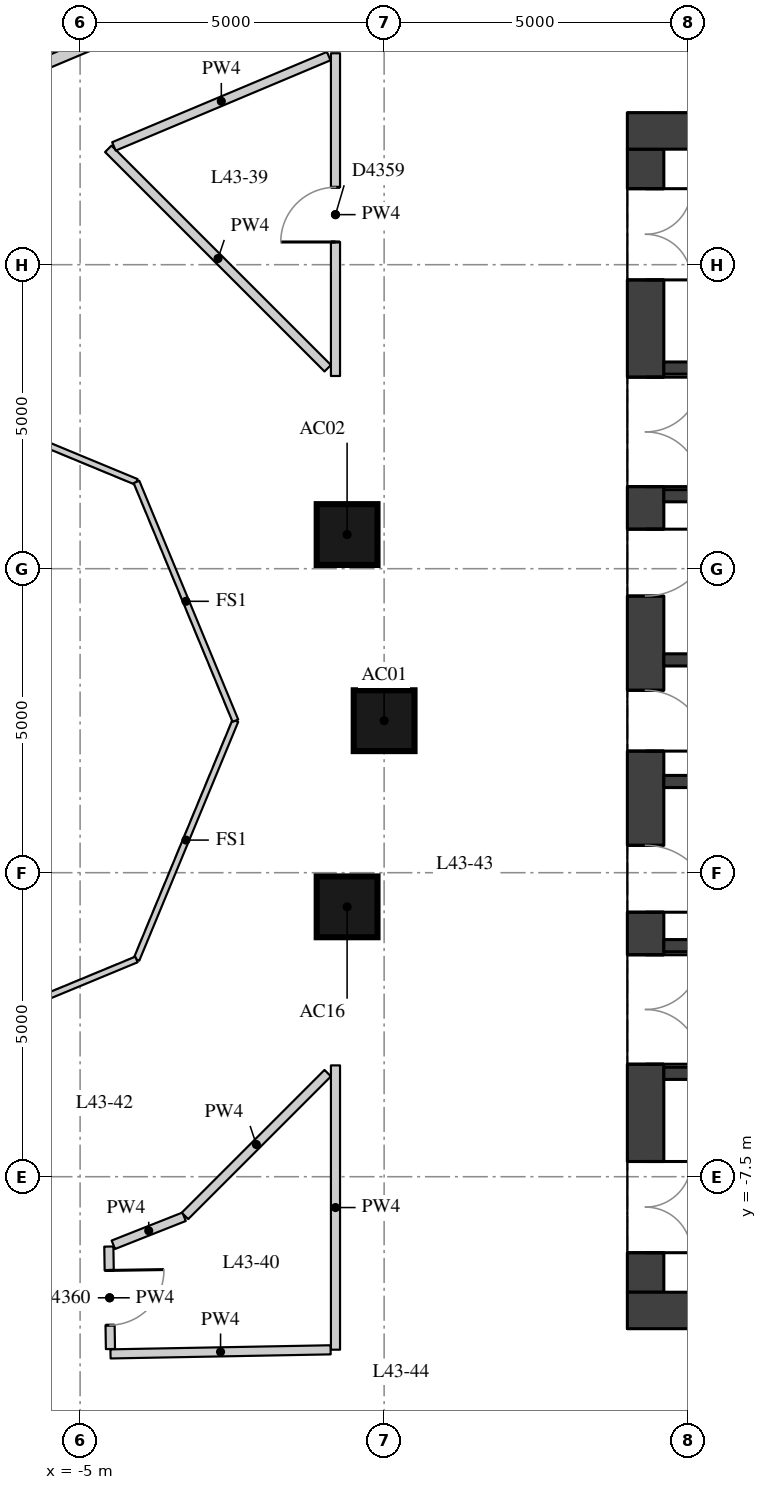
"""IFC4 building model, lengths in metres.
Left out: names, types, materials, properties, quantities, classifications, styles, units other than length and angle.
Written with IfcOpenShell. Run it as: python <this file> out.ifc"""

import sys

from ifc_helpers import new_model, si_unit, direction, frame, frame_2d, origin, origin_2d, place, context, subcontext, project, spatial, rectangle, extrude, element, fill, save


model = new_model("IFC4")
c1 = context("Model", 3, precision=1e-05, world=origin(), true_north=direction((0.0, 1.0)))
c2 = subcontext(c1, "Body", "Model", "MODEL_VIEW")
j1 = project(units=[si_unit("LENGTHUNIT", "METRE"), si_unit("PLANEANGLEUNIT", "RADIAN")], contexts=[c1])
p1 = place(None, origin())
s1 = spatial("IfcSite", under=j1, at=p1, CompositionType="ELEMENT")
p2 = place(p1, origin())
s2 = spatial("IfcBuilding", under=s1, at=p2, CompositionType="ELEMENT")
p3 = place(p2, frame((0.0, 0.0, 155.0)))
s3 = spatial("IfcBuildingStorey", under=s2, at=p3, CompositionType="ELEMENT", Elevation=155.0)
for number, where, z_axis, x_axis in (
    (1, (0.0, 0.0, 0.0), (0.0, 0.0, 1.0), (1.0, 0.0, 0.0)),
    (2, (-0.609, 3.062, 0.0), (0.0, 0.0, 1.0), (1.0, 0.0, 0.0)),
    (3, (-0.609, -3.062, 0.0), (0.0, 0.0, 1.0), (1.0, 0.0, 0.0)),
):
    element("IfcColumn", number, at=place(p3, frame(where, z_axis=z_axis, x_axis=x_axis)), inside=s3, PredefinedType="COLUMN", context=c2, shape_type="SweptSolid", body=[
        extrude(rectangle(XDim=1.0, YDim=1.0, at=origin_2d()), origin(), (0.0, 0.0, 1.0), 3.3),
    ])
p4 = place(p3, frame((4.3, -9.4, 0.0), z_axis=(0.0, 0.0, 1.0), x_axis=(0.0, 1.0, 0.0)))
e4 = element("IfcWall", 4, at=p4, inside=s3, PredefinedType="SHEAR", context=c2, shape_type="SweptSolid", body=[
    extrude(rectangle(XDim=18.8, YDim=0.6, at=frame_2d((9.4, 0.0))), origin(), (0.0, 0.0, 1.0), 3.02),
])
p5 = place(p4, frame((0.65, 0.0, 0.0)))
e5 = element("IfcOpeningElement", 5, at=p5, cuts=e4, PredefinedType="OPENING", context=c2, shape_type="SweptSolid", body=[
    extrude(rectangle(XDim=1.5, YDim=2.1, at=frame_2d((0.75, 1.05))), frame((0.0, 0.31, 0.0), z_axis=(0.0, -1.0, 0.0), x_axis=(1.0, 0.0, 0.0)), (0.0, 0.0, 1.0), 0.62),
])
p6 = place(p4, frame((3.75, 0.0, 0.0)))
e6 = element("IfcOpeningElement", 6, at=p6, cuts=e4, PredefinedType="OPENING", context=c2, shape_type="SweptSolid", body=[
    extrude(rectangle(XDim=1.8, YDim=2.1, at=frame_2d((0.9, 1.05))), frame((0.0, 0.31, 0.0), z_axis=(0.0, -1.0, 0.0), x_axis=(1.0, 0.0, 0.0)), (0.0, 0.0, 1.0), 0.62),
])
p7 = place(p4, frame((6.25, 0.0, 0.0)))
e7 = element("IfcOpeningElement", 7, at=p7, cuts=e4, PredefinedType="OPENING", context=c2, shape_type="SweptSolid", body=[
    extrude(rectangle(XDim=1.1, YDim=2.1, at=frame_2d((0.55, 1.05))), frame((0.0, 0.31, 0.0), z_axis=(0.0, -1.0, 0.0), x_axis=(1.0, 0.0, 0.0)), (0.0, 0.0, 1.0), 0.62),
])
p8 = place(p4, frame((8.9, 0.0, 0.0)))
e8 = element("IfcOpeningElement", 8, at=p8, cuts=e4, PredefinedType="OPENING", context=c2, shape_type="SweptSolid", body=[
    extrude(rectangle(XDim=1.0, YDim=2.1, at=frame_2d((0.5, 1.05))), frame((0.0, 0.31, 0.0), z_axis=(0.0, -1.0, 0.0), x_axis=(1.0, 0.0, 0.0)), (0.0, 0.0, 1.0), 0.62),
])
p9 = place(p4, frame((11.45, 0.0, 0.0)))
e9 = element("IfcOpeningElement", 9, at=p9, cuts=e4, PredefinedType="OPENING", context=c2, shape_type="SweptSolid", body=[
    extrude(rectangle(XDim=1.1, YDim=2.1, at=frame_2d((0.55, 1.05))), frame((0.0, 0.31, 0.0), z_axis=(0.0, -1.0, 0.0), x_axis=(1.0, 0.0, 0.0)), (0.0, 0.0, 1.0), 0.62),
])
p10 = place(p4, frame((13.25, 0.0, 0.0)))
e10 = element("IfcOpeningElement", 10, at=p10, cuts=e4, PredefinedType="OPENING", context=c2, shape_type="SweptSolid", body=[
    extrude(rectangle(XDim=1.8, YDim=2.1, at=frame_2d((0.9, 1.05))), frame((0.0, 0.31, 0.0), z_axis=(0.0, -1.0, 0.0), x_axis=(1.0, 0.0, 0.0)), (0.0, 0.0, 1.0), 0.62),
])
p11 = place(p4, frame((16.65, 0.0, 0.0)))
e11 = element("IfcOpeningElement", 11, at=p11, cuts=e4, PredefinedType="OPENING", context=c2, shape_type="SweptSolid", body=[
    extrude(rectangle(XDim=1.5, YDim=2.1, at=frame_2d((0.75, 1.05))), frame((0.0, 0.31, 0.0), z_axis=(0.0, -1.0, 0.0), x_axis=(1.0, 0.0, 0.0)), (0.0, 0.0, 1.0), 0.62),
])
for number, where, z_axis, x_axis in (
    (12, (4.0, 9.7, 0.0), (0.0, 0.0, 1.0), (1.0, 0.0, 0.0)),
    (13, (4.0, -9.7, 0.0), (0.0, 0.0, 1.0), (1.0, 0.0, 0.0)),
):
    element("IfcWall", number, at=place(p3, frame(where, z_axis=z_axis, x_axis=x_axis)), inside=s3, PredefinedType="SHEAR", context=c2, shape_type="SweptSolid", body=[
        extrude(rectangle(XDim=12.0, YDim=0.6, at=frame_2d((6.0, 0.0))), origin(), (0.0, 0.0, 1.0), 3.02),
    ])
p12 = place(p3, frame((4.6, 5.8, 0.0), z_axis=(0.0, 0.0, 1.0), x_axis=(1.0, 0.0, 0.0)))
e14 = element("IfcWall", 14, at=p12, inside=s3, PredefinedType="SHEAR", context=c2, shape_type="SweptSolid", body=[
    extrude(rectangle(XDim=10.8, YDim=0.2, at=frame_2d((5.4, 0.0))), origin(), (0.0, 0.0, 1.0), 3.02),
])
p13 = place(p12, frame((7.05, 0.0, 0.0)))
e15 = element("IfcOpeningElement", 15, at=p13, cuts=e14, PredefinedType="OPENING", context=c2, shape_type="SweptSolid", body=[
    extrude(rectangle(XDim=1.1, YDim=2.1, at=frame_2d((0.55, 1.05))), frame((0.0, 0.11, 0.0), z_axis=(0.0, -1.0, 0.0), x_axis=(1.0, 0.0, 0.0)), (0.0, 0.0, 1.0), 0.22),
])
p14 = place(p12, frame((9.05, 0.0, 0.0)))
e16 = element("IfcOpeningElement", 16, at=p14, cuts=e14, PredefinedType="OPENING", context=c2, shape_type="SweptSolid", body=[
    extrude(rectangle(XDim=1.1, YDim=2.1, at=frame_2d((0.55, 1.05))), frame((0.0, 0.11, 0.0), z_axis=(0.0, -1.0, 0.0), x_axis=(1.0, 0.0, 0.0)), (0.0, 0.0, 1.0), 0.22),
])
p15 = place(p3, frame((4.6, 3.7, 0.0), z_axis=(0.0, 0.0, 1.0), x_axis=(1.0, 0.0, 0.0)))
e17 = element("IfcWall", 17, at=p15, inside=s3, PredefinedType="SHEAR", context=c2, shape_type="SweptSolid", body=[
    extrude(rectangle(XDim=10.8, YDim=0.2, at=frame_2d((5.4, 0.0))), origin(), (0.0, 0.0, 1.0), 3.02),
])
p16 = place(p15, frame((6.6, 0.0, 0.0)))
e18 = element("IfcOpeningElement", 18, at=p16, cuts=e17, PredefinedType="OPENING", context=c2, shape_type="SweptSolid", body=[
    extrude(rectangle(XDim=1.1, YDim=2.1, at=frame_2d((0.55, 1.05))), frame((0.0, 0.11, 0.0), z_axis=(0.0, -1.0, 0.0), x_axis=(1.0, 0.0, 0.0)), (0.0, 0.0, 1.0), 0.22),
])
p17 = place(p15, frame((8.9, 0.0, 0.0)))
e19 = element("IfcOpeningElement", 19, at=p17, cuts=e17, PredefinedType="OPENING", context=c2, shape_type="SweptSolid", body=[
    extrude(rectangle(XDim=1.1, YDim=2.1, at=frame_2d((0.55, 1.05))), frame((0.0, 0.11, 0.0), z_axis=(0.0, -1.0, 0.0), x_axis=(1.0, 0.0, 0.0)), (0.0, 0.0, 1.0), 0.22),
])
for number, where, z_axis, x_axis in (
    (20, (4.6, 1.0, 0.0), (0.0, 0.0, 1.0), (1.0, 0.0, 0.0)),
    (21, (4.6, -1.0, 0.0), (0.0, 0.0, 1.0), (1.0, 0.0, 0.0)),
):
    element("IfcWall", number, at=place(p3, frame(where, z_axis=z_axis, x_axis=x_axis)), inside=s3, PredefinedType="SHEAR", context=c2, shape_type="SweptSolid", body=[
        extrude(rectangle(XDim=10.8, YDim=0.2, at=frame_2d((5.4, 0.0))), origin(), (0.0, 0.0, 1.0), 3.02),
    ])
p18 = place(p3, frame((4.6, -3.7, 0.0), z_axis=(0.0, 0.0, 1.0), x_axis=(1.0, 0.0, 0.0)))
e22 = element("IfcWall", 22, at=p18, inside=s3, PredefinedType="SHEAR", context=c2, shape_type="SweptSolid", body=[
    extrude(rectangle(XDim=10.8, YDim=0.2, at=frame_2d((5.4, 0.0))), origin(), (0.0, 0.0, 1.0), 3.02),
])
p19 = place(p18, frame((6.6, 0.0, 0.0)))
e23 = element("IfcOpeningElement", 23, at=p19, cuts=e22, PredefinedType="OPENING", context=c2, shape_type="SweptSolid", body=[
    extrude(rectangle(XDim=1.1, YDim=2.1, at=frame_2d((0.55, 1.05))), frame((0.0, 0.11, 0.0), z_axis=(0.0, -1.0, 0.0), x_axis=(1.0, 0.0, 0.0)), (0.0, 0.0, 1.0), 0.22),
])
p20 = place(p18, frame((8.9, 0.0, 0.0)))
e24 = element("IfcOpeningElement", 24, at=p20, cuts=e22, PredefinedType="OPENING", context=c2, shape_type="SweptSolid", body=[
    extrude(rectangle(XDim=1.1, YDim=2.1, at=frame_2d((0.55, 1.05))), frame((0.0, 0.11, 0.0), z_axis=(0.0, -1.0, 0.0), x_axis=(1.0, 0.0, 0.0)), (0.0, 0.0, 1.0), 0.22),
])
p21 = place(p3, frame((4.6, -5.8, 0.0), z_axis=(0.0, 0.0, 1.0), x_axis=(1.0, 0.0, 0.0)))
e25 = element("IfcWall", 25, at=p21, inside=s3, PredefinedType="SHEAR", context=c2, shape_type="SweptSolid", body=[
    extrude(rectangle(XDim=10.8, YDim=0.2, at=frame_2d((5.4, 0.0))), origin(), (0.0, 0.0, 1.0), 3.02),
])
p22 = place(p3, frame((-5.343, -12.093, 0.0), z_axis=(0.0, 0.0, 1.0), x_axis=(-0.796104996328, 0.605158520407, 0.0)))
e26 = element("IfcWall", 26, at=p22, inside=s3, PredefinedType="PARTITIONING", context=c2, shape_type="SweptSolid", body=[
    extrude(rectangle(XDim=2.961, YDim=0.2, at=frame_2d((1.48, 0.0))), origin(), (0.0, 0.0, 1.0), 3.02),
])
p23 = place(p3, frame((-7.57, 9.975, 0.0), z_axis=(0.0, 0.0, 1.0), x_axis=(0.921815879705, 0.387628022624, 0.0)))
e27 = element("IfcWall", 27, at=p23, inside=s3, PredefinedType="PARTITIONING", context=c2, shape_type="SweptSolid", body=[
    extrude(rectangle(XDim=8.321, YDim=0.2, at=frame_2d((4.16, 0.0))), origin(), (0.0, 0.0, 1.0), 3.02),
])
p24 = place(p23, frame((4.721, 0.0, 0.0)))
e28 = element("IfcOpeningElement", 28, at=p24, cuts=e27, PredefinedType="OPENING", context=c2, shape_type="SweptSolid", body=[
    extrude(rectangle(XDim=1.8, YDim=2.1, at=frame_2d((0.9, 1.05))), frame((0.0, 0.11, 0.0), z_axis=(0.0, -1.0, 0.0), x_axis=(1.0, 0.0, 0.0)), (0.0, 0.0, 1.0), 0.22),
])
p25 = place(p3, frame((-0.8, 10.977, 0.0), z_axis=(0.0, 0.0, 1.0), x_axis=(0.0, -1.0, 0.0)))
e29 = element("IfcWall", 29, at=p25, inside=s3, PredefinedType="PARTITIONING", context=c2, shape_type="SweptSolid", body=[
    extrude(rectangle(XDim=5.308, YDim=0.15, at=frame_2d((2.654, 0.0))), origin(), (0.0, 0.0, 1.0), 3.02),
])
p26 = place(p25, frame((2.204, 0.0, 0.0)))
e30 = element("IfcOpeningElement", 30, at=p26, cuts=e29, PredefinedType="OPENING", context=c2, shape_type="SweptSolid", body=[
    extrude(rectangle(XDim=0.9, YDim=2.1, at=frame_2d((0.45, 1.05))), frame((0.0, 0.085, 0.0), z_axis=(0.0, -1.0, 0.0), x_axis=(1.0, 0.0, 0.0)), (0.0, 0.0, 1.0), 0.17),
])
p27 = place(p3, frame((-0.927, 5.797, 0.0), z_axis=(0.0, 0.0, 1.0), x_axis=(-0.707106781187, 0.707106781187, 0.0)))
e31 = element("IfcWall", 31, at=p27, inside=s3, PredefinedType="PARTITIONING", context=c2, shape_type="SweptSolid", body=[
    extrude(rectangle(XDim=5.104, YDim=0.15, at=frame_2d((2.552, 0.0))), origin(), (0.0, 0.0, 1.0), 3.02),
])
p28 = place(p3, frame((-4.444, 9.445, 0.0), z_axis=(0.0, 0.0, 1.0), x_axis=(0.921822351054, 0.387612632788, 0.0)))
e32 = element("IfcWall", 32, at=p28, inside=s3, PredefinedType="PARTITIONING", context=c2, shape_type="SweptSolid", body=[
    extrude(rectangle(XDim=3.832, YDim=0.15, at=frame_2d((1.916, 0.0))), origin(), (0.0, 0.0, 1.0), 3.02),
])
p29 = place(p3, frame((-0.8, -5.669, 0.0), z_axis=(0.0, 0.0, 1.0), x_axis=(0.0, -1.0, 0.0)))
e33 = element("IfcWall", 33, at=p29, inside=s3, PredefinedType="PARTITIONING", context=c2, shape_type="SweptSolid", body=[
    extrude(rectangle(XDim=4.676, YDim=0.15, at=frame_2d((2.338, 0.0))), origin(), (0.0, 0.0, 1.0), 3.02),
])
p30 = place(p3, frame((-0.88, -10.347, 0.0), z_axis=(0.0, 0.0, 1.0), x_axis=(-0.999826791681, -0.018611465199, 0.0)))
e34 = element("IfcWall", 34, at=p30, inside=s3, PredefinedType="PARTITIONING", context=c2, shape_type="SweptSolid", body=[
    extrude(rectangle(XDim=3.621, YDim=0.15, at=frame_2d((1.81, 0.0))), origin(), (0.0, 0.0, 1.0), 3.02),
])
p31 = place(p3, frame((-4.501, -10.334, 0.0), z_axis=(0.0, 0.0, 1.0), x_axis=(-0.015785981736, 0.999875393627, 0.0)))
e35 = element("IfcWall", 35, at=p31, inside=s3, PredefinedType="PARTITIONING", context=c2, shape_type="SweptSolid", body=[
    extrude(rectangle(XDim=1.686, YDim=0.15, at=frame_2d((0.843, 0.0))), origin(), (0.0, 0.0, 1.0), 3.02),
])
p32 = place(p31, frame((0.393, 0.0, 0.0)))
e36 = element("IfcOpeningElement", 36, at=p32, cuts=e35, PredefinedType="OPENING", context=c2, shape_type="SweptSolid", body=[
    extrude(rectangle(XDim=0.9, YDim=2.1, at=frame_2d((0.45, 1.05))), frame((0.0, 0.085, 0.0), z_axis=(0.0, -1.0, 0.0), x_axis=(1.0, 0.0, 0.0)), (0.0, 0.0, 1.0), 0.17),
])
p33 = place(p3, frame((-4.453, -8.62, 0.0), z_axis=(0.0, 0.0, 1.0), x_axis=(0.929802441214, 0.36805899026, 0.0)))
e37 = element("IfcWall", 37, at=p33, inside=s3, PredefinedType="PARTITIONING", context=c2, shape_type="SweptSolid", body=[
    extrude(rectangle(XDim=1.252, YDim=0.15, at=frame_2d((0.626, 0.0))), origin(), (0.0, 0.0, 1.0), 3.02),
])
p34 = place(p3, frame((-3.275, -8.145, 0.0), z_axis=(0.0, 0.0, 1.0), x_axis=(0.707106781187, 0.707106781187, 0.0)))
e38 = element("IfcWall", 38, at=p34, inside=s3, PredefinedType="PARTITIONING", context=c2, shape_type="SweptSolid", body=[
    extrude(rectangle(XDim=3.32, YDim=0.15, at=frame_2d((1.66, 0.0))), origin(), (0.0, 0.0, 1.0), 3.02),
])
for number, where, z_axis, x_axis in (
    (39, (-2.446, 0.0, 0.0), (0.0, 0.0, 1.0), (-0.383, -0.924, 0.0)),
    (40, (-4.073, -3.927, 0.0), (0.0, 0.0, 1.0), (-0.924, -0.383, 0.0)),
    (41, (-8.0, 5.554, 0.0), (0.0, 0.0, 1.0), (0.924, -0.383, 0.0)),
    (42, (-4.073, 3.927, 0.0), (0.0, 0.0, 1.0), (0.383, -0.924, 0.0)),
):
    element("IfcWall", number, at=place(p3, frame(where, z_axis=z_axis, x_axis=x_axis)), inside=s3, PredefinedType="PARTITIONING", context=c2, shape_type="SweptSolid", body=[
        extrude(rectangle(XDim=4.251, YDim=0.1, at=frame_2d((2.125, 0.0))), origin(), (0.0, 0.0, 1.0), 3.02),
    ])
p35 = place(p5, origin())
e43 = element("IfcDoor", 43, at=p35, inside=s3, OperationType="DOUBLE_DOOR_SINGLE_SWING", PredefinedType="DOOR", context=c2, shape_type="SweptSolid", body=[
    extrude(rectangle(XDim=1.5, YDim=2.1, at=frame_2d((0.75, 1.05))), frame((0.0, 0.025, 0.0), z_axis=(0.0, -1.0, 0.0), x_axis=(1.0, 0.0, 0.0)), (0.0, 0.0, 1.0), 0.05),
])
fill(e5, e43)
p36 = place(p6, origin())
e44 = element("IfcDoor", 44, at=p36, inside=s3, OperationType="DOUBLE_DOOR_SINGLE_SWING", PredefinedType="DOOR", context=c2, shape_type="SweptSolid", body=[
    extrude(rectangle(XDim=1.8, YDim=2.1, at=frame_2d((0.9, 1.05))), frame((0.0, 0.025, 0.0), z_axis=(0.0, -1.0, 0.0), x_axis=(1.0, 0.0, 0.0)), (0.0, 0.0, 1.0), 0.05),
])
fill(e6, e44)
p37 = place(p7, origin())
e45 = element("IfcDoor", 45, at=p37, inside=s3, OperationType="SINGLE_SWING_RIGHT", PredefinedType="DOOR", context=c2, shape_type="SweptSolid", body=[
    extrude(rectangle(XDim=1.1, YDim=2.1, at=frame_2d((0.55, 1.05))), frame((0.0, 0.025, 0.0), z_axis=(0.0, -1.0, 0.0), x_axis=(1.0, 0.0, 0.0)), (0.0, 0.0, 1.0), 0.05),
])
fill(e7, e45)
p38 = place(p8, origin())
e46 = element("IfcDoor", 46, at=p38, inside=s3, OperationType="SINGLE_SWING_RIGHT", PredefinedType="DOOR", context=c2, shape_type="SweptSolid", body=[
    extrude(rectangle(XDim=1.0, YDim=2.1, at=frame_2d((0.5, 1.05))), frame((0.0, 0.025, 0.0), z_axis=(0.0, -1.0, 0.0), x_axis=(1.0, 0.0, 0.0)), (0.0, 0.0, 1.0), 0.05),
])
fill(e8, e46)
p39 = place(p9, origin())
e47 = element("IfcDoor", 47, at=p39, inside=s3, OperationType="SINGLE_SWING_LEFT", PredefinedType="DOOR", context=c2, shape_type="SweptSolid", body=[
    extrude(rectangle(XDim=1.1, YDim=2.1, at=frame_2d((0.55, 1.05))), frame((0.0, 0.025, 0.0), z_axis=(0.0, -1.0, 0.0), x_axis=(1.0, 0.0, 0.0)), (0.0, 0.0, 1.0), 0.05),
])
fill(e9, e47)
p40 = place(p10, origin())
e48 = element("IfcDoor", 48, at=p40, inside=s3, OperationType="DOUBLE_DOOR_SINGLE_SWING", PredefinedType="DOOR", context=c2, shape_type="SweptSolid", body=[
    extrude(rectangle(XDim=1.8, YDim=2.1, at=frame_2d((0.9, 1.05))), frame((0.0, 0.025, 0.0), z_axis=(0.0, -1.0, 0.0), x_axis=(1.0, 0.0, 0.0)), (0.0, 0.0, 1.0), 0.05),
])
fill(e10, e48)
p41 = place(p11, origin())
e49 = element("IfcDoor", 49, at=p41, inside=s3, OperationType="DOUBLE_DOOR_SINGLE_SWING", PredefinedType="DOOR", context=c2, shape_type="SweptSolid", body=[
    extrude(rectangle(XDim=1.5, YDim=2.1, at=frame_2d((0.75, 1.05))), frame((0.0, 0.025, 0.0), z_axis=(0.0, -1.0, 0.0), x_axis=(1.0, 0.0, 0.0)), (0.0, 0.0, 1.0), 0.05),
])
fill(e11, e49)
p42 = place(p26, origin())
e50 = element("IfcDoor", 50, at=p42, inside=s3, OperationType="SINGLE_SWING_LEFT", PredefinedType="DOOR", context=c2, shape_type="SweptSolid", body=[
    extrude(rectangle(XDim=0.9, YDim=2.1, at=frame_2d((0.45, 1.05))), frame((0.0, 0.025, 0.0), z_axis=(0.0, -1.0, 0.0), x_axis=(1.0, 0.0, 0.0)), (0.0, 0.0, 1.0), 0.05),
])
fill(e30, e50)
p43 = place(p32, origin())
e51 = element("IfcDoor", 51, at=p43, inside=s3, OperationType="SINGLE_SWING_LEFT", PredefinedType="DOOR", context=c2, shape_type="SweptSolid", body=[
    extrude(rectangle(XDim=0.9, YDim=2.1, at=frame_2d((0.45, 1.05))), frame((0.0, 0.025, 0.0), z_axis=(0.0, -1.0, 0.0), x_axis=(1.0, 0.0, 0.0)), (0.0, 0.0, 1.0), 0.05),
])
fill(e36, e51)
save(model, sys.argv[1])
